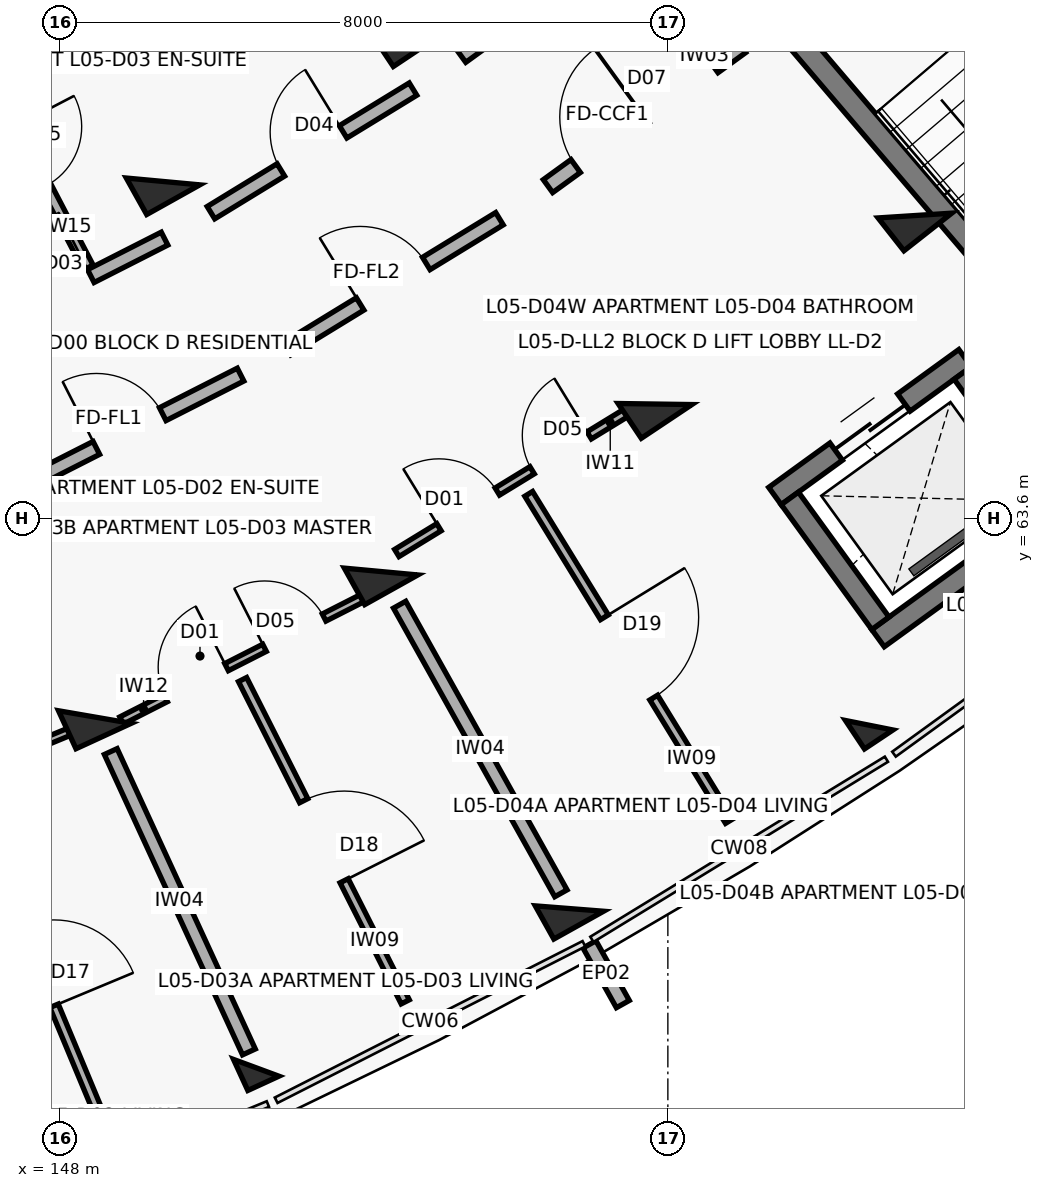
"""IFC4 building model, lengths in metres.
Left out: names, types, materials, properties, quantities, classifications, styles, units other than length and angle.
Written with IfcOpenShell. Run it as: python <this file> out.ifc"""

import sys

from ifc_helpers import new_model, si_unit, direction, frame, frame_2d, origin, origin_2d, place, context, subcontext, project, spatial, rectangle, extrude, element, fill, save


model = new_model("IFC4")
c1 = context("Model", 3, precision=1e-05, world=origin(), true_north=direction((0.0, 1.0)))
c2 = subcontext(c1, "Body", "Model", "MODEL_VIEW")
j1 = project(units=[si_unit("LENGTHUNIT", "METRE"), si_unit("PLANEANGLEUNIT", "RADIAN")], contexts=[c1])
p1 = place(None, origin())
s1 = spatial("IfcSite", under=j1, at=p1, CompositionType="ELEMENT")
p2 = place(p1, origin())
s2 = spatial("IfcBuilding", under=s1, at=p2, CompositionType="ELEMENT")
p3 = place(p2, frame((0.0, 0.0, 17.4)))
s3 = spatial("IfcBuildingStorey", under=s2, at=p3, CompositionType="ELEMENT", Elevation=17.4)
p4 = place(p3, frame((148.461, 60.982, 0.0), z_axis=(0.0, 0.0, 1.0), x_axis=(0.417867073801, -0.908508177527, 0.0)))
e1 = element("IfcColumn", 1, at=p4, inside=s3, PredefinedType="COLUMN", context=c2, shape_type="SweptSolid", body=[
    extrude(rectangle(XDim=0.55, YDim=0.8, at=origin_2d()), origin(), (0.0, 0.0, 1.0), 3.1),
])
p5 = place(p3, frame((150.584, 56.367, 0.0), z_axis=(0.0, 0.0, 1.0), x_axis=(0.417867073801, -0.908508177527, 0.0)))
e2 = element("IfcColumn", 2, at=p5, inside=s3, PredefinedType="COLUMN", context=c2, shape_type="SweptSolid", body=[
    extrude(rectangle(XDim=0.45, YDim=0.45, at=origin_2d()), origin(), (0.0, 0.0, 1.0), 3.1),
])
for number, where, z_axis, x_axis in (
    (3, (149.358, 68.03, 0.0), (0.0, 0.0, 1.0), (0.488, -0.873, 0.0)),
    (4, (152.227, 62.897, 0.0), (0.0, 0.0, 1.0), (0.488, -0.873, 0.0)),
):
    element("IfcColumn", number, at=place(p3, frame(where, z_axis=z_axis, x_axis=x_axis)), inside=s3, PredefinedType="COLUMN", context=c2, shape_type="SweptSolid", body=[
        extrude(rectangle(XDim=0.55, YDim=0.8, at=origin_2d()), origin(), (0.0, 0.0, 1.0), 3.1),
    ])
p6 = place(p3, frame((154.705, 58.462, 0.0), z_axis=(0.0, 0.0, 1.0), x_axis=(0.487859659139, -0.87292207727, 0.0)))
e5 = element("IfcColumn", 5, at=p6, inside=s3, PredefinedType="COLUMN", context=c2, shape_type="SweptSolid", body=[
    extrude(rectangle(XDim=0.5, YDim=0.75, at=origin_2d()), origin(), (0.0, 0.0, 1.0), 3.1),
])
for number, where, z_axis, x_axis in (
    (6, (152.568, 69.993, 0.0), (0.0, 0.0, 1.0), (0.555, -0.832, 0.0)),
    (7, (155.831, 65.101, 0.0), (0.0, 0.0, 1.0), (0.555, -0.832, 0.0)),
):
    element("IfcColumn", number, at=place(p3, frame(where, z_axis=z_axis, x_axis=x_axis)), inside=s3, PredefinedType="COLUMN", context=c2, shape_type="SweptSolid", body=[
        extrude(rectangle(XDim=0.55, YDim=0.8, at=origin_2d()), origin(), (0.0, 0.0, 1.0), 3.1),
    ])
p7 = place(p3, frame((158.649, 60.875, 0.0), z_axis=(0.0, 0.0, 1.0), x_axis=(0.554844427448, -0.83195412213, 0.0)))
e8 = element("IfcColumn", 8, at=p7, inside=s3, PredefinedType="COLUMN", context=c2, shape_type="SweptSolid", body=[
    extrude(rectangle(XDim=0.45, YDim=0.45, at=origin_2d()), origin(), (0.0, 0.0, 1.0), 3.1),
])
p8 = place(p3, frame((159.25, 67.581, 0.0), z_axis=(0.0, 0.0, 1.0), x_axis=(0.618408395358, -0.785856893175, 0.0)))
e9 = element("IfcColumn", 9, at=p8, inside=s3, PredefinedType="COLUMN", context=c2, shape_type="SweptSolid", body=[
    extrude(rectangle(XDim=0.55, YDim=0.8, at=origin_2d()), origin(), (0.0, 0.0, 1.0), 3.1),
])
p9 = place(p3, frame((154.969, 57.991, 0.0), z_axis=(0.0, 0.0, 1.0), x_axis=(0.487967253808, -0.872861935939, 0.0)))
e10 = element("IfcWall", 10, at=p9, inside=s3, PredefinedType="PARAPET", context=c2, shape_type="SweptSolid", body=[
    extrude(rectangle(XDim=0.9, YDim=0.195, at=frame_2d((0.45, 0.0))), origin(), (0.0, 0.0, 1.0), 2.25),
])
p10 = place(p3, frame((157.583, 70.041, 0.0), z_axis=(0.0, 0.0, 1.0), x_axis=(0.648762810187, -0.760990680704, 0.0)))
e11 = element("IfcWall", 11, at=p10, inside=s3, PredefinedType="SHEAR", context=c2, shape_type="SweptSolid", body=[
    extrude(rectangle(XDim=7.69, YDim=0.3, at=frame_2d((3.845, 0.0))), origin(), (0.0, 0.0, 1.0), 3.1),
])
p11 = place(p3, frame((157.409, 63.89, 0.0), z_axis=(0.0, 0.0, 1.0), x_axis=(0.809510936031, 0.587104798521, 0.0)))
e12 = element("IfcWall", 12, at=p11, inside=s3, PredefinedType="SHEAR", context=c2, shape_type="SweptSolid", body=[
    extrude(rectangle(XDim=3.09, YDim=0.28, at=frame_2d((1.545, 0.0))), origin(), (0.0, 0.0, 1.0), 3.1),
])
p12 = place(p11, frame((0.995, 0.0, 0.0)))
e13 = element("IfcOpeningElement", 13, at=p12, cuts=e12, PredefinedType="OPENING", context=c2, shape_type="SweptSolid", body=[
    extrude(rectangle(XDim=1.1, YDim=2.15, at=frame_2d((0.55, 1.075))), frame((0.0, 0.15, 0.0), z_axis=(0.0, -1.0, 0.0), x_axis=(1.0, 0.0, 0.0)), (0.0, 0.0, 1.0), 0.3),
])
p13 = place(p3, frame((158.765, 62.021, 0.0), z_axis=(0.0, 0.0, 1.0), x_axis=(0.809548485838, 0.587053020669, 0.0)))
e14 = element("IfcWall", 14, at=p13, inside=s3, PredefinedType="SHEAR", context=c2, shape_type="SweptSolid", body=[
    extrude(rectangle(XDim=3.09, YDim=0.28, at=frame_2d((1.545, 0.0))), origin(), (0.0, 0.0, 1.0), 3.1),
])
p14 = place(p3, frame((157.604, 63.859, 0.0), z_axis=(0.0, 0.0, 1.0), x_axis=(0.587127188998, -0.809494696671, 0.0)))
e15 = element("IfcWall", 15, at=p14, inside=s3, PredefinedType="SHEAR", context=c2, shape_type="SweptSolid", body=[
    extrude(rectangle(XDim=2.03, YDim=0.28, at=frame_2d((1.015, 0.0))), origin(), (0.0, 0.0, 1.0), 3.1),
])
p15 = place(p3, frame((159.879, 65.509, 0.0), z_axis=(0.0, 0.0, 1.0), x_axis=(0.58704837408, -0.809551855344, 0.0)))
e16 = element("IfcWall", 16, at=p15, inside=s3, PredefinedType="SHEAR", context=c2, shape_type="SweptSolid", body=[
    extrude(rectangle(XDim=2.03, YDim=0.28, at=frame_2d((1.015, 0.0))), origin(), (0.0, 0.0, 1.0), 3.1),
])
p16 = place(p3, frame((144.852, 59.437, 0.0), z_axis=(0.0, 0.0, 1.0), x_axis=(0.924217547919, 0.381866369453, 0.0)))
e17 = element("IfcWall", 17, at=p16, inside=s3, PredefinedType="PARTITIONING", context=c2, shape_type="SweptSolid", body=[
    extrude(rectangle(XDim=3.628, YDim=0.1, at=frame_2d((1.814, 0.0))), origin(), (0.0, 0.0, 1.0), 2.08),
])
p17 = place(p16, frame((0.65, 0.0, 0.0)))
e18 = element("IfcOpeningElement", 18, at=p17, cuts=e17, PredefinedType="OPENING", context=c2, shape_type="SweptSolid", body=[
    extrude(rectangle(XDim=0.9, YDim=2.1, at=frame_2d((0.45, 1.05))), frame((0.0, 0.06, 0.0), z_axis=(0.0, -1.0, 0.0), x_axis=(1.0, 0.0, 0.0)), (0.0, 0.0, 1.0), 0.12),
])
p18 = place(p16, frame((2.098, 0.0, 0.0)))
e19 = element("IfcOpeningElement", 19, at=p18, cuts=e17, PredefinedType="OPENING", context=c2, shape_type="SweptSolid", body=[
    extrude(rectangle(XDim=0.88, YDim=2.1, at=frame_2d((0.44, 1.05))), frame((0.0, 0.06, 0.0), z_axis=(0.0, -1.0, 0.0), x_axis=(1.0, 0.0, 0.0)), (0.0, 0.0, 1.0), 0.12),
])
p19 = place(p3, frame((146.765, 59.966, 0.0), z_axis=(0.0, 0.0, 1.0), x_axis=(0.384548164276, -0.923104928679, 0.0)))
e20 = element("IfcWall", 20, at=p19, inside=s3, PredefinedType="PARTITIONING", context=c2, shape_type="SweptSolid", body=[
    extrude(rectangle(XDim=4.9, YDim=0.12, at=frame_2d((2.45, 0.0))), origin(), (0.0, 0.0, 1.0), 2.08),
])
p20 = place(p19, frame((1.885, 0.0, 0.0)))
e21 = element("IfcOpeningElement", 21, at=p20, cuts=e20, PredefinedType="OPENING", context=c2, shape_type="SweptSolid", body=[
    extrude(rectangle(XDim=1.13, YDim=2.1, at=frame_2d((0.565, 1.05))), frame((0.0, 0.07, 0.0), z_axis=(0.0, -1.0, 0.0), x_axis=(1.0, 0.0, 0.0)), (0.0, 0.0, 1.0), 0.14),
])
p21 = place(p3, frame((147.457, 64.003, 0.0), z_axis=(0.0, 0.0, 1.0), x_axis=(0.891412167565, 0.45319349898, 0.0)))
e22 = element("IfcWall", 22, at=p21, inside=s3, PredefinedType="SOLIDWALL", context=c2, shape_type="SweptSolid", body=[
    extrude(rectangle(XDim=3.277, YDim=0.19, at=frame_2d((1.639, 0.0))), origin(), (0.0, 0.0, 1.0), 2.08),
])
p22 = place(p21, frame((1.148, 0.0, 0.0)))
e23 = element("IfcOpeningElement", 23, at=p22, cuts=e22, PredefinedType="OPENING", context=c2, shape_type="SweptSolid", body=[
    extrude(rectangle(XDim=0.98, YDim=2.15, at=frame_2d((0.49, 1.075))), frame((0.0, 0.105, 0.0), z_axis=(0.0, -1.0, 0.0), x_axis=(1.0, 0.0, 0.0)), (0.0, 0.0, 1.0), 0.21),
])
p23 = place(p3, frame((146.6, 65.865, 0.0), z_axis=(0.0, 0.0, 1.0), x_axis=(0.891414101388, 0.453189695212, 0.0)))
e24 = element("IfcWall", 24, at=p23, inside=s3, PredefinedType="SOLIDWALL", context=c2, shape_type="SweptSolid", body=[
    extrude(rectangle(XDim=3.116, YDim=0.19, at=frame_2d((1.558, 0.0))), origin(), (0.0, 0.0, 1.0), 2.08),
])
p24 = place(p23, frame((1.088, 0.0, 0.0)))
e25 = element("IfcOpeningElement", 25, at=p24, cuts=e24, PredefinedType="OPENING", context=c2, shape_type="SweptSolid", body=[
    extrude(rectangle(XDim=0.94, YDim=2.1, at=frame_2d((0.47, 1.05))), frame((0.0, 0.105, 0.0), z_axis=(0.0, -1.0, 0.0), x_axis=(1.0, 0.0, 0.0)), (0.0, 0.0, 1.0), 0.21),
])
p25 = place(p3, frame((146.849, 69.822, 0.0), z_axis=(0.0, 0.0, 1.0), x_axis=(0.462242343884, -0.886753638572, 0.0)))
e26 = element("IfcWall", 26, at=p25, inside=s3, PredefinedType="PARTITIONING", context=c2, shape_type="SweptSolid", body=[
    extrude(rectangle(XDim=3.3, YDim=0.145, at=frame_2d((1.65, 0.0))), origin(), (0.0, 0.0, 1.0), 2.08),
])
p26 = place(p25, frame((1.21, 0.0, 0.0)))
e27 = element("IfcOpeningElement", 27, at=p26, cuts=e26, PredefinedType="OPENING", context=c2, shape_type="SweptSolid", body=[
    extrude(rectangle(XDim=0.88, YDim=2.1, at=frame_2d((0.44, 1.05))), frame((0.0, 0.083, 0.0), z_axis=(0.0, -1.0, 0.0), x_axis=(1.0, 0.0, 0.0)), (0.0, 0.0, 1.0), 0.165),
])
p27 = place(p3, frame((148.812, 60.937, 0.0), z_axis=(0.0, 0.0, 1.0), x_axis=(0.89140212369, 0.453213254309, 0.0)))
e28 = element("IfcWall", 28, at=p27, inside=s3, PredefinedType="PARTITIONING", context=c2, shape_type="SweptSolid", body=[
    extrude(rectangle(XDim=3.64, YDim=0.105, at=frame_2d((1.82, 0.0))), origin(), (0.0, 0.0, 1.0), 2.08),
])
p28 = place(p27, frame((0.65, 0.0, 0.0)))
e29 = element("IfcOpeningElement", 29, at=p28, cuts=e28, PredefinedType="OPENING", context=c2, shape_type="SweptSolid", body=[
    extrude(rectangle(XDim=0.9, YDim=2.1, at=frame_2d((0.45, 1.05))), frame((0.0, 0.062, 0.0), z_axis=(0.0, -1.0, 0.0), x_axis=(1.0, 0.0, 0.0)), (0.0, 0.0, 1.0), 0.125),
])
p29 = place(p27, frame((2.11, 0.0, 0.0)))
e30 = element("IfcOpeningElement", 30, at=p29, cuts=e28, PredefinedType="OPENING", context=c2, shape_type="SweptSolid", body=[
    extrude(rectangle(XDim=0.88, YDim=2.1, at=frame_2d((0.44, 1.05))), frame((0.0, 0.062, 0.0), z_axis=(0.0, -1.0, 0.0), x_axis=(1.0, 0.0, 0.0)), (0.0, 0.0, 1.0), 0.125),
])
p30 = place(p3, frame((150.404, 61.475, 0.0), z_axis=(0.0, 0.0, 1.0), x_axis=(0.450664257057, -0.892693523787, 0.0)))
e31 = element("IfcWall", 31, at=p30, inside=s3, PredefinedType="PARTITIONING", context=c2, shape_type="SweptSolid", body=[
    extrude(rectangle(XDim=4.75, YDim=0.12, at=frame_2d((2.375, 0.0))), origin(), (0.0, 0.0, 1.0), 2.08),
])
p31 = place(p30, frame((1.785, 0.0, 0.0)))
e32 = element("IfcOpeningElement", 32, at=p31, cuts=e31, PredefinedType="OPENING", context=c2, shape_type="SweptSolid", body=[
    extrude(rectangle(XDim=1.18, YDim=2.1, at=frame_2d((0.59, 1.05))), frame((0.0, 0.07, 0.0), z_axis=(0.0, -1.0, 0.0), x_axis=(1.0, 0.0, 0.0)), (0.0, 0.0, 1.0), 0.14),
])
p32 = place(p3, frame((148.67, 60.528, 0.0), z_axis=(0.0, 0.0, 1.0), x_axis=(0.417837051164, -0.908521985796, 0.0)))
e33 = element("IfcWall", 33, at=p32, inside=s3, PredefinedType="SOLIDWALL", context=c2, shape_type="SweptSolid", body=[
    extrude(rectangle(XDim=4.35, YDim=0.185, at=frame_2d((2.175, 0.0))), origin(), (0.0, 0.0, 1.0), 2.08),
])
p33 = place(p3, frame((150.989, 65.829, 0.0), z_axis=(0.0, 0.0, 1.0), x_axis=(0.853090237845, 0.521763400492, 0.0)))
e34 = element("IfcWall", 34, at=p33, inside=s3, PredefinedType="SOLIDWALL", context=c2, shape_type="SweptSolid", body=[
    extrude(rectangle(XDim=3.277, YDim=0.19, at=frame_2d((1.638, 0.0))), origin(), (0.0, 0.0, 1.0), 2.08),
])
p34 = place(p33, frame((1.128, 0.0, 0.0)))
e35 = element("IfcOpeningElement", 35, at=p34, cuts=e34, PredefinedType="OPENING", context=c2, shape_type="SweptSolid", body=[
    extrude(rectangle(XDim=1.02, YDim=2.15, at=frame_2d((0.51, 1.075))), frame((0.0, 0.105, 0.0), z_axis=(0.0, -1.0, 0.0), x_axis=(1.0, 0.0, 0.0)), (0.0, 0.0, 1.0), 0.21),
])
p35 = place(p3, frame((149.989, 67.619, 0.0), z_axis=(0.0, 0.0, 1.0), x_axis=(0.853121049608, 0.5217130195, 0.0)))
e36 = element("IfcWall", 36, at=p35, inside=s3, PredefinedType="SOLIDWALL", context=c2, shape_type="SweptSolid", body=[
    extrude(rectangle(XDim=3.116, YDim=0.19, at=frame_2d((1.558, 0.0))), origin(), (0.0, 0.0, 1.0), 2.08),
])
p36 = place(p35, frame((1.078, 0.0, 0.0)))
e37 = element("IfcOpeningElement", 37, at=p36, cuts=e36, PredefinedType="OPENING", context=c2, shape_type="SweptSolid", body=[
    extrude(rectangle(XDim=0.96, YDim=2.1, at=frame_2d((0.48, 1.05))), frame((0.0, 0.105, 0.0), z_axis=(0.0, -1.0, 0.0), x_axis=(1.0, 0.0, 0.0)), (0.0, 0.0, 1.0), 0.21),
])
p37 = place(p3, frame((152.434, 63.141, 0.0), z_axis=(0.0, 0.0, 1.0), x_axis=(0.853089873067, 0.521763996909, 0.0)))
e38 = element("IfcWall", 38, at=p37, inside=s3, PredefinedType="PARTITIONING", context=c2, shape_type="SweptSolid", body=[
    extrude(rectangle(XDim=3.616, YDim=0.11, at=frame_2d((1.808, 0.0))), origin(), (0.0, 0.0, 1.0), 2.08),
])
p38 = place(p37, frame((0.65, 0.0, 0.0)))
e39 = element("IfcOpeningElement", 39, at=p38, cuts=e38, PredefinedType="OPENING", context=c2, shape_type="SweptSolid", body=[
    extrude(rectangle(XDim=0.9, YDim=2.1, at=frame_2d((0.45, 1.05))), frame((0.0, 0.065, 0.0), z_axis=(0.0, -1.0, 0.0), x_axis=(1.0, 0.0, 0.0)), (0.0, 0.0, 1.0), 0.13),
])
p39 = place(p37, frame((2.086, 0.0, 0.0)))
e40 = element("IfcOpeningElement", 40, at=p39, cuts=e38, PredefinedType="OPENING", context=c2, shape_type="SweptSolid", body=[
    extrude(rectangle(XDim=0.88, YDim=2.1, at=frame_2d((0.44, 1.05))), frame((0.0, 0.065, 0.0), z_axis=(0.0, -1.0, 0.0), x_axis=(1.0, 0.0, 0.0)), (0.0, 0.0, 1.0), 0.13),
])
p40 = place(p3, frame((154.169, 63.919, 0.0), z_axis=(0.0, 0.0, 1.0), x_axis=(0.522980301869, -0.852344768188, 0.0)))
e41 = element("IfcWall", 41, at=p40, inside=s3, PredefinedType="PARTITIONING", context=c2, shape_type="SweptSolid", body=[
    extrude(rectangle(XDim=5.05, YDim=0.12, at=frame_2d((2.525, 0.0))), origin(), (0.0, 0.0, 1.0), 2.08),
])
p41 = place(p40, frame((1.905, 0.0, 0.0)))
e42 = element("IfcOpeningElement", 42, at=p41, cuts=e41, PredefinedType="OPENING", context=c2, shape_type="SweptSolid", body=[
    extrude(rectangle(XDim=1.24, YDim=2.1, at=frame_2d((0.62, 1.05))), frame((0.0, 0.07, 0.0), z_axis=(0.0, -1.0, 0.0), x_axis=(1.0, 0.0, 0.0)), (0.0, 0.0, 1.0), 0.14),
])
p42 = place(p3, frame((152.471, 62.46, 0.0), z_axis=(0.0, 0.0, 1.0), x_axis=(0.487866639184, -0.872918176218, 0.0)))
e43 = element("IfcWall", 43, at=p42, inside=s3, PredefinedType="SOLIDWALL", context=c2, shape_type="SweptSolid", body=[
    extrude(rectangle(XDim=4.35, YDim=0.185, at=frame_2d((2.175, 0.0))), origin(), (0.0, 0.0, 1.0), 2.08),
])
p43 = place(p3, frame((154.423, 67.968, 0.0), z_axis=(0.0, 0.0, 1.0), x_axis=(0.809516127005, 0.587097641043, 0.0)))
e44 = element("IfcWall", 44, at=p43, inside=s3, PredefinedType="SOLIDWALL", context=c2, shape_type="SweptSolid", body=[
    extrude(rectangle(XDim=3.137, YDim=0.21, at=frame_2d((1.569, 0.0))), origin(), (0.0, 0.0, 1.0), 2.08),
])
p44 = place(p43, frame((0.45, 0.0, 0.0)))
e45 = element("IfcOpeningElement", 45, at=p44, cuts=e44, PredefinedType="OPENING", context=c2, shape_type="SweptSolid", body=[
    extrude(rectangle(XDim=1.1, YDim=2.15, at=frame_2d((0.55, 1.075))), frame((0.0, 0.115, 0.0), z_axis=(0.0, -1.0, 0.0), x_axis=(1.0, 0.0, 0.0)), (0.0, 0.0, 1.0), 0.23),
])
p45 = place(p43, frame((1.567, 0.0, 0.0)))
e46 = element("IfcOpeningElement", 46, at=p45, cuts=e44, PredefinedType="OPENING", context=c2, shape_type="SweptSolid", body=[
    extrude(rectangle(XDim=1.12, YDim=2.15, at=frame_2d((0.56, 1.075))), frame((0.0, 0.115, 0.0), z_axis=(0.0, -1.0, 0.0), x_axis=(1.0, 0.0, 0.0)), (0.0, 0.0, 1.0), 0.23),
])
p46 = place(p3, frame((153.285, 69.674, 0.0), z_axis=(0.0, 0.0, 1.0), x_axis=(0.809505174959, 0.587112741911, 0.0)))
e47 = element("IfcWall", 47, at=p46, inside=s3, PredefinedType="SOLIDWALL", context=c2, shape_type="SweptSolid", body=[
    extrude(rectangle(XDim=2.976, YDim=0.19, at=frame_2d((1.488, 0.0))), origin(), (0.0, 0.0, 1.0), 2.08),
])
p47 = place(p46, frame((0.928, 0.0, 0.0)))
e48 = element("IfcOpeningElement", 48, at=p47, cuts=e47, PredefinedType="OPENING", context=c2, shape_type="SweptSolid", body=[
    extrude(rectangle(XDim=1.12, YDim=2.15, at=frame_2d((0.56, 1.075))), frame((0.0, 0.105, 0.0), z_axis=(0.0, -1.0, 0.0), x_axis=(1.0, 0.0, 0.0)), (0.0, 0.0, 1.0), 0.21),
])
p48 = place(p12, origin())
e49 = element("IfcDoor", 49, at=p48, inside=s3, OperationType="DOUBLE_DOOR_SLIDING", PredefinedType="DOOR", context=c2, shape_type="SweptSolid", body=[
    extrude(rectangle(XDim=1.1, YDim=2.15, at=frame_2d((0.55, 1.075))), frame((0.0, 0.025, 0.0), z_axis=(0.0, -1.0, 0.0), x_axis=(1.0, 0.0, 0.0)), (0.0, 0.0, 1.0), 0.05),
])
fill(e13, e49)
p49 = place(p20, origin())
e50 = element("IfcDoor", 50, at=p49, inside=s3, OperationType="SINGLE_SWING_RIGHT", PredefinedType="DOOR", context=c2, shape_type="SweptSolid", body=[
    extrude(rectangle(XDim=1.13, YDim=2.1, at=frame_2d((0.565, 1.05))), frame((0.0, 0.025, 0.0), z_axis=(0.0, -1.0, 0.0), x_axis=(1.0, 0.0, 0.0)), (0.0, 0.0, 1.0), 0.05),
])
fill(e21, e50)
p50 = place(p22, origin())
e51 = element("IfcDoor", 51, at=p50, inside=s3, OperationType="SINGLE_SWING_LEFT", PredefinedType="DOOR", context=c2, shape_type="SweptSolid", body=[
    extrude(rectangle(XDim=0.98, YDim=2.15, at=frame_2d((0.49, 1.075))), frame((0.0, 0.025, 0.0), z_axis=(0.0, -1.0, 0.0), x_axis=(1.0, 0.0, 0.0)), (0.0, 0.0, 1.0), 0.05),
])
fill(e23, e51)
p51 = place(p24, origin())
e52 = element("IfcDoor", 52, at=p51, inside=s3, OperationType="SINGLE_SWING_RIGHT", PredefinedType="DOOR", context=c2, shape_type="SweptSolid", body=[
    extrude(rectangle(XDim=0.94, YDim=2.1, at=frame_2d((0.47, 1.05))), frame((0.0, 0.025, 0.0), z_axis=(0.0, -1.0, 0.0), x_axis=(1.0, 0.0, 0.0)), (0.0, 0.0, 1.0), 0.05),
])
fill(e25, e52)
p52 = place(p28, origin())
e53 = element("IfcDoor", 53, at=p52, inside=s3, OperationType="SINGLE_SWING_RIGHT", PredefinedType="DOOR", context=c2, shape_type="SweptSolid", body=[
    extrude(rectangle(XDim=0.9, YDim=2.1, at=frame_2d((0.45, 1.05))), frame((0.0, 0.025, 0.0), z_axis=(0.0, -1.0, 0.0), x_axis=(1.0, 0.0, 0.0)), (0.0, 0.0, 1.0), 0.05),
])
fill(e29, e53)
p53 = place(p29, origin())
e54 = element("IfcDoor", 54, at=p53, inside=s3, OperationType="SINGLE_SWING_LEFT", PredefinedType="DOOR", context=c2, shape_type="SweptSolid", body=[
    extrude(rectangle(XDim=0.88, YDim=2.1, at=frame_2d((0.44, 1.05))), frame((0.0, 0.025, 0.0), z_axis=(0.0, -1.0, 0.0), x_axis=(1.0, 0.0, 0.0)), (0.0, 0.0, 1.0), 0.05),
])
fill(e30, e54)
p54 = place(p31, origin())
e55 = element("IfcDoor", 55, at=p54, inside=s3, OperationType="SINGLE_SWING_RIGHT", PredefinedType="DOOR", context=c2, shape_type="SweptSolid", body=[
    extrude(rectangle(XDim=1.18, YDim=2.1, at=frame_2d((0.59, 1.05))), frame((0.0, 0.025, 0.0), z_axis=(0.0, -1.0, 0.0), x_axis=(1.0, 0.0, 0.0)), (0.0, 0.0, 1.0), 0.05),
])
fill(e32, e55)
p55 = place(p34, origin())
e56 = element("IfcDoor", 56, at=p55, inside=s3, OperationType="SINGLE_SWING_LEFT", PredefinedType="DOOR", context=c2, shape_type="SweptSolid", body=[
    extrude(rectangle(XDim=1.02, YDim=2.15, at=frame_2d((0.51, 1.075))), frame((0.0, 0.025, 0.0), z_axis=(0.0, -1.0, 0.0), x_axis=(1.0, 0.0, 0.0)), (0.0, 0.0, 1.0), 0.05),
])
fill(e35, e56)
p56 = place(p36, origin())
e57 = element("IfcDoor", 57, at=p56, inside=s3, OperationType="SINGLE_SWING_RIGHT", PredefinedType="DOOR", context=c2, shape_type="SweptSolid", body=[
    extrude(rectangle(XDim=0.96, YDim=2.1, at=frame_2d((0.48, 1.05))), frame((0.0, 0.025, 0.0), z_axis=(0.0, -1.0, 0.0), x_axis=(1.0, 0.0, 0.0)), (0.0, 0.0, 1.0), 0.05),
])
fill(e37, e57)
p57 = place(p38, origin())
e58 = element("IfcDoor", 58, at=p57, inside=s3, OperationType="SINGLE_SWING_LEFT", PredefinedType="DOOR", context=c2, shape_type="SweptSolid", body=[
    extrude(rectangle(XDim=0.9, YDim=2.1, at=frame_2d((0.45, 1.05))), frame((0.0, 0.025, 0.0), z_axis=(0.0, -1.0, 0.0), x_axis=(1.0, 0.0, 0.0)), (0.0, 0.0, 1.0), 0.05),
])
fill(e39, e58)
p58 = place(p39, origin())
e59 = element("IfcDoor", 59, at=p58, inside=s3, OperationType="SINGLE_SWING_RIGHT", PredefinedType="DOOR", context=c2, shape_type="SweptSolid", body=[
    extrude(rectangle(XDim=0.88, YDim=2.1, at=frame_2d((0.44, 1.05))), frame((0.0, 0.025, 0.0), z_axis=(0.0, -1.0, 0.0), x_axis=(1.0, 0.0, 0.0)), (0.0, 0.0, 1.0), 0.05),
])
fill(e40, e59)
p59 = place(p41, origin())
e60 = element("IfcDoor", 60, at=p59, inside=s3, OperationType="SINGLE_SWING_LEFT", PredefinedType="DOOR", context=c2, shape_type="SweptSolid", body=[
    extrude(rectangle(XDim=1.24, YDim=2.1, at=frame_2d((0.62, 1.05))), frame((0.0, 0.025, 0.0), z_axis=(0.0, -1.0, 0.0), x_axis=(1.0, 0.0, 0.0)), (0.0, 0.0, 1.0), 0.05),
])
fill(e42, e60)
p60 = place(p44, origin())
e61 = element("IfcDoor", 61, at=p60, inside=s3, OperationType="SINGLE_SWING_RIGHT", PredefinedType="DOOR", context=c2, shape_type="SweptSolid", body=[
    extrude(rectangle(XDim=1.1, YDim=2.15, at=frame_2d((0.55, 1.075))), frame((0.0, 0.025, 0.0), z_axis=(0.0, -1.0, 0.0), x_axis=(1.0, 0.0, 0.0)), (0.0, 0.0, 1.0), 0.05),
])
fill(e45, e61)
p61 = place(p45, origin())
e62 = element("IfcDoor", 62, at=p61, inside=s3, OperationType="SINGLE_SWING_LEFT", PredefinedType="DOOR", context=c2, shape_type="SweptSolid", body=[
    extrude(rectangle(XDim=1.12, YDim=2.15, at=frame_2d((0.56, 1.075))), frame((0.0, 0.025, 0.0), z_axis=(0.0, -1.0, 0.0), x_axis=(1.0, 0.0, 0.0)), (0.0, 0.0, 1.0), 0.05),
])
fill(e46, e62)
save(model, sys.argv[1])
